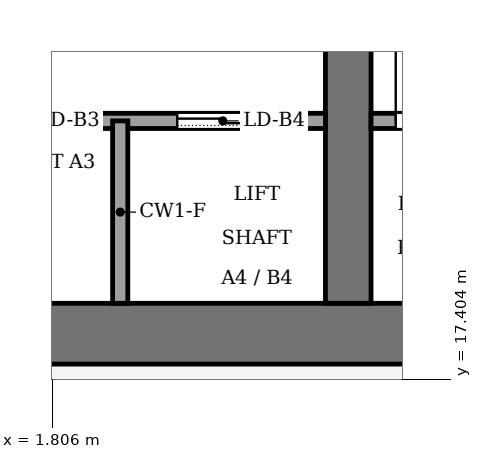
"""IFC4 building model, lengths in metres.
Left out: names, types, materials, properties, quantities, classifications, styles, units other than length and angle.
Written with IfcOpenShell. Run it as: python <this file> out.ifc"""

import sys

from ifc_helpers import new_model, si_unit, direction, frame, frame_2d, origin, place, context, subcontext, project, spatial, rectangle, extrude, element, fill, save


model = new_model("IFC4")
c1 = context("Model", 3, precision=1e-05, world=origin(), true_north=direction((0.0, 1.0)))
c2 = subcontext(c1, "Body", "Model", "MODEL_VIEW")
j1 = project(units=[si_unit("LENGTHUNIT", "METRE"), si_unit("PLANEANGLEUNIT", "RADIAN")], contexts=[c1])
p1 = place(None, origin())
s1 = spatial("IfcSite", under=j1, at=p1, CompositionType="ELEMENT")
p2 = place(p1, origin())
s2 = spatial("IfcBuilding", under=s1, at=p2, CompositionType="ELEMENT")
p3 = place(p2, frame((0.0, 0.0, 250.0)))
s3 = spatial("IfcBuildingStorey", under=s2, at=p3, CompositionType="ELEMENT", Elevation=250.0)
p4 = place(p3, frame((-13.4, 18.0, -0.13), z_axis=(0.0, 0.0, 1.0), x_axis=(1.0, 0.0, 0.0)))
e1 = element("IfcWall", 1, at=p4, inside=s3, PredefinedType="SHEAR", context=c2, shape_type="SweptSolid", body=[
    extrude(rectangle(XDim=26.8, YDim=0.8, at=frame_2d((13.4, 0.0))), origin(), (0.0, 0.0, 1.0), 4.0),
])
p5 = place(p3, frame((5.7, 18.4, -0.13), z_axis=(0.0, 0.0, 1.0), x_axis=(0.0, 1.0, 0.0)))
e2 = element("IfcWall", 2, at=p5, inside=s3, PredefinedType="SHEAR", context=c2, shape_type="SweptSolid", body=[
    extrude(rectangle(XDim=19.2, YDim=0.6, at=frame_2d((9.6, 0.0))), origin(), (0.0, 0.0, 1.0), 4.0),
])
p6 = place(p5, frame((13.3, 0.0, 0.13)))
e3 = element("IfcOpeningElement", 3, at=p6, cuts=e2, PredefinedType="OPENING", context=c2, shape_type="SweptSolid", body=[
    extrude(rectangle(XDim=2.4, YDim=2.4, at=frame_2d((1.2, 1.2))), frame((0.0, 0.31, 0.0), z_axis=(0.0, -1.0, 0.0), x_axis=(1.0, 0.0, 0.0)), (0.0, 0.0, 1.0), 0.62),
])
p7 = place(p3, frame((-5.4, 20.8, 0.0), z_axis=(0.0, 0.0, 1.0), x_axis=(1.0, 0.0, 0.0)))
e4 = element("IfcWall", 4, at=p7, inside=s3, PredefinedType="PARTITIONING", context=c2, shape_type="SweptSolid", body=[
    extrude(rectangle(XDim=10.8, YDim=0.2, at=frame_2d((5.4, 0.0))), origin(), (0.0, 0.0, 1.0), 3.87),
])
p8 = place(p7, frame((0.75, 0.0, 0.0)))
e5 = element("IfcOpeningElement", 5, at=p8, cuts=e4, PredefinedType="OPENING", context=c2, shape_type="SweptSolid", body=[
    extrude(rectangle(XDim=1.2, YDim=2.2, at=frame_2d((0.6, 1.1))), frame((0.0, 0.11, 0.0), z_axis=(0.0, -1.0, 0.0), x_axis=(1.0, 0.0, 0.0)), (0.0, 0.0, 1.0), 0.22),
])
p9 = place(p7, frame((3.45, 0.0, 0.0)))
e6 = element("IfcOpeningElement", 6, at=p9, cuts=e4, PredefinedType="OPENING", context=c2, shape_type="SweptSolid", body=[
    extrude(rectangle(XDim=1.2, YDim=2.2, at=frame_2d((0.6, 1.1))), frame((0.0, 0.11, 0.0), z_axis=(0.0, -1.0, 0.0), x_axis=(1.0, 0.0, 0.0)), (0.0, 0.0, 1.0), 0.22),
])
p10 = place(p7, frame((6.15, 0.0, 0.0)))
e7 = element("IfcOpeningElement", 7, at=p10, cuts=e4, PredefinedType="OPENING", context=c2, shape_type="SweptSolid", body=[
    extrude(rectangle(XDim=1.2, YDim=2.2, at=frame_2d((0.6, 1.1))), frame((0.0, 0.11, 0.0), z_axis=(0.0, -1.0, 0.0), x_axis=(1.0, 0.0, 0.0)), (0.0, 0.0, 1.0), 0.22),
])
p11 = place(p7, frame((8.85, 0.0, 0.0)))
e8 = element("IfcOpeningElement", 8, at=p11, cuts=e4, PredefinedType="OPENING", context=c2, shape_type="SweptSolid", body=[
    extrude(rectangle(XDim=1.2, YDim=2.2, at=frame_2d((0.6, 1.1))), frame((0.0, 0.11, 0.0), z_axis=(0.0, -1.0, 0.0), x_axis=(1.0, 0.0, 0.0)), (0.0, 0.0, 1.0), 0.22),
])
p12 = place(p3, frame((6.0, 20.8, 0.0), z_axis=(0.0, 0.0, 1.0), x_axis=(1.0, 0.0, 0.0)))
e9 = element("IfcWall", 9, at=p12, inside=s3, PredefinedType="PARTITIONING", context=c2, shape_type="SweptSolid", body=[
    extrude(rectangle(XDim=6.6, YDim=0.2, at=frame_2d((3.3, 0.0))), origin(), (0.0, 0.0, 1.0), 3.87),
])
p13 = place(p12, frame((0.325, 0.0, 0.0)))
e10 = element("IfcOpeningElement", 10, at=p13, cuts=e9, PredefinedType="OPENING", context=c2, shape_type="SweptSolid", body=[
    extrude(rectangle(XDim=1.0, YDim=2.1, at=frame_2d((0.5, 1.05))), frame((0.0, 0.11, 0.0), z_axis=(0.0, -1.0, 0.0), x_axis=(1.0, 0.0, 0.0)), (0.0, 0.0, 1.0), 0.22),
])
p14 = place(p12, frame((2.8, 0.0, 0.0)))
e11 = element("IfcOpeningElement", 11, at=p14, cuts=e9, PredefinedType="OPENING", context=c2, shape_type="SweptSolid", body=[
    extrude(rectangle(XDim=1.0, YDim=2.1, at=frame_2d((0.5, 1.05))), frame((0.0, 0.11, 0.0), z_axis=(0.0, -1.0, 0.0), x_axis=(1.0, 0.0, 0.0)), (0.0, 0.0, 1.0), 0.22),
])
p15 = place(p12, frame((5.275, 0.0, 0.0)))
e12 = element("IfcOpeningElement", 12, at=p15, cuts=e9, PredefinedType="OPENING", context=c2, shape_type="SweptSolid", body=[
    extrude(rectangle(XDim=1.0, YDim=2.1, at=frame_2d((0.5, 1.05))), frame((0.0, 0.11, 0.0), z_axis=(0.0, -1.0, 0.0), x_axis=(1.0, 0.0, 0.0)), (0.0, 0.0, 1.0), 0.22),
])
p16 = place(p3, frame((2.7, 18.4, 0.0), z_axis=(0.0, 0.0, 1.0), x_axis=(0.0, 1.0, 0.0)))
e13 = element("IfcWall", 13, at=p16, inside=s3, PredefinedType="PARTITIONING", context=c2, shape_type="SweptSolid", body=[
    extrude(rectangle(XDim=2.4, YDim=0.2, at=frame_2d((1.2, 0.0))), origin(), (0.0, 0.0, 1.0), 3.87),
])
p17 = place(p10, origin())
e14 = element("IfcDoor", 14, at=p17, inside=s3, OperationType="SLIDING_TO_LEFT", PredefinedType="DOOR", context=c2, shape_type="SweptSolid", body=[
    extrude(rectangle(XDim=1.2, YDim=2.2, at=frame_2d((0.6, 1.1))), frame((0.0, 0.025, 0.0), z_axis=(0.0, -1.0, 0.0), x_axis=(1.0, 0.0, 0.0)), (0.0, 0.0, 1.0), 0.05),
])
fill(e7, e14)
p18 = place(p11, origin())
e15 = element("IfcDoor", 15, at=p18, inside=s3, OperationType="SLIDING_TO_LEFT", PredefinedType="DOOR", context=c2, shape_type="SweptSolid", body=[
    extrude(rectangle(XDim=1.2, YDim=2.2, at=frame_2d((0.6, 1.1))), frame((0.0, 0.025, 0.0), z_axis=(0.0, -1.0, 0.0), x_axis=(1.0, 0.0, 0.0)), (0.0, 0.0, 1.0), 0.05),
])
fill(e8, e15)
p19 = place(p13, origin())
e16 = element("IfcDoor", 16, at=p19, inside=s3, OperationType="SINGLE_SWING_LEFT", PredefinedType="DOOR", context=c2, shape_type="SweptSolid", body=[
    extrude(rectangle(XDim=1.0, YDim=2.1, at=frame_2d((0.5, 1.05))), frame((0.0, 0.025, 0.0), z_axis=(0.0, -1.0, 0.0), x_axis=(1.0, 0.0, 0.0)), (0.0, 0.0, 1.0), 0.05),
])
fill(e10, e16)
save(model, sys.argv[1])
